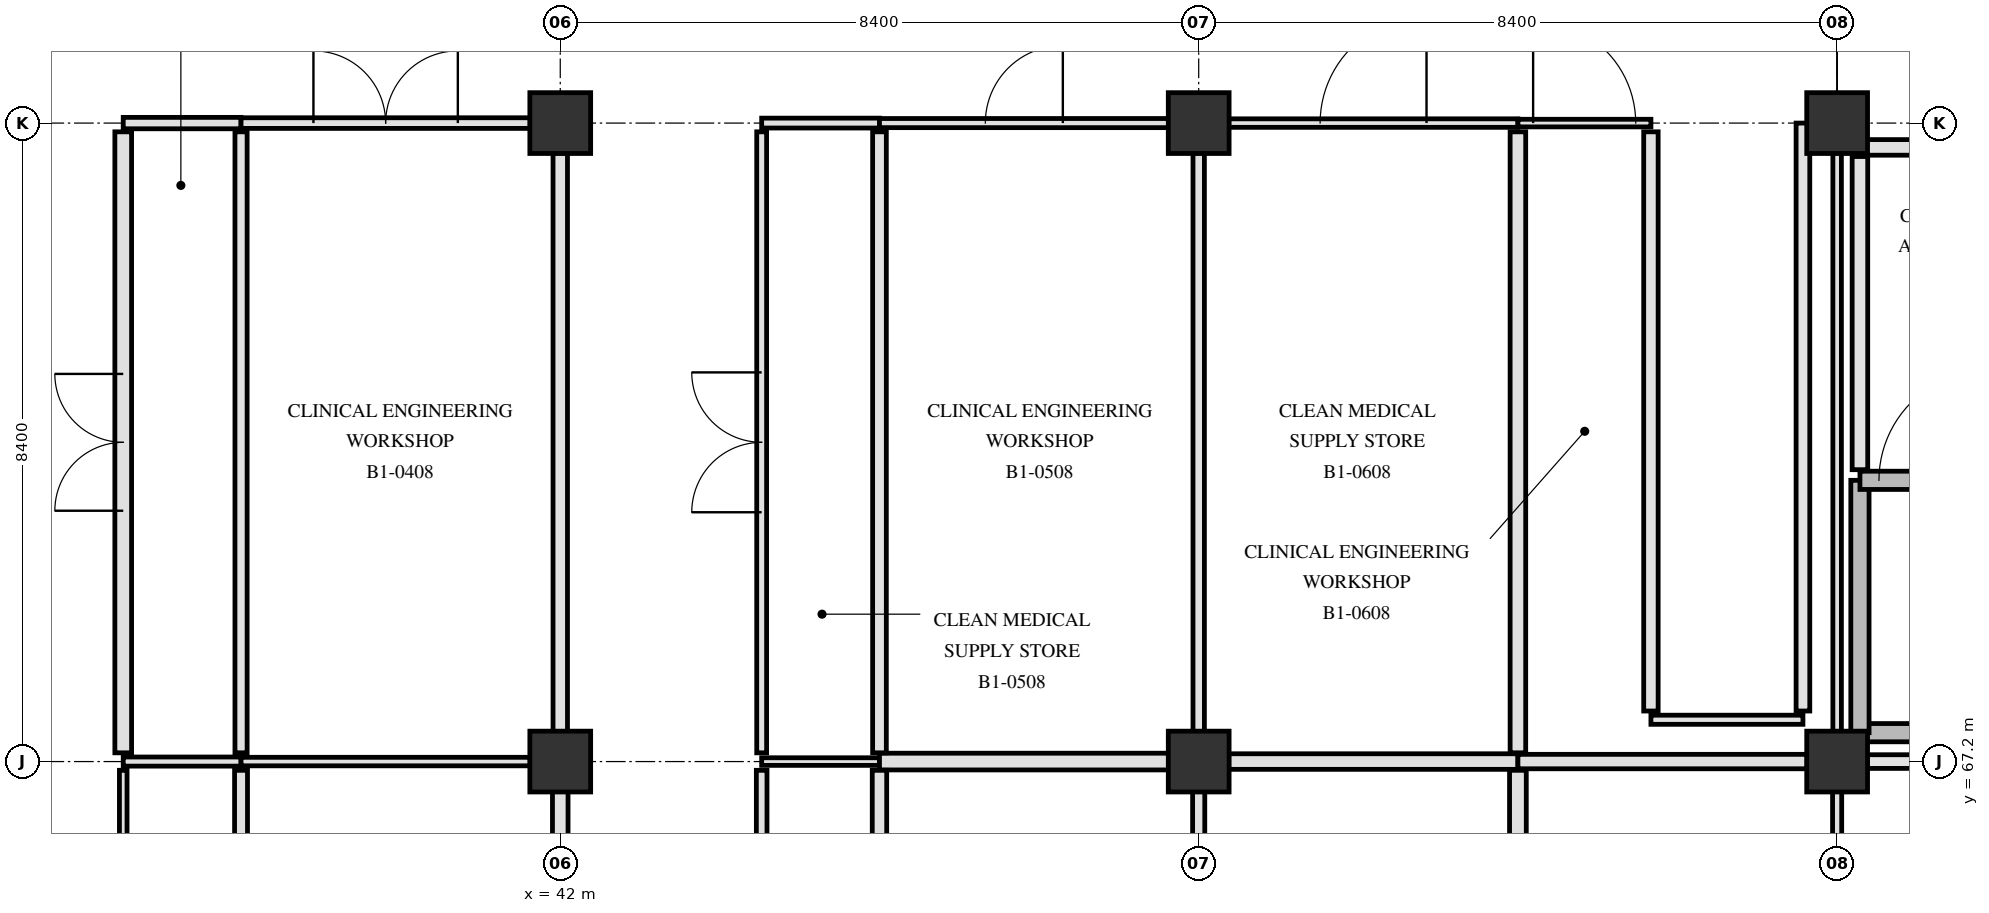
"""IFC4 building model, lengths in metres.
Left out: names, types, materials, properties, quantities, classifications, styles, units other than length and angle.
Written with IfcOpenShell. Run it as: python <this file> out.ifc"""

import sys

from ifc_helpers import new_model, si_unit, direction, frame, frame_2d, origin, origin_2d, place, context, subcontext, project, spatial, rectangle, extrude, element, fill, save


model = new_model("IFC4")
c1 = context("Model", 3, precision=1e-05, world=origin(), true_north=direction((0.0, 1.0)))
c2 = subcontext(c1, "Body", "Model", "MODEL_VIEW")
j1 = project(units=[si_unit("LENGTHUNIT", "METRE"), si_unit("PLANEANGLEUNIT", "RADIAN")], contexts=[c1])
p1 = place(None, origin())
s1 = spatial("IfcSite", under=j1, at=p1, CompositionType="ELEMENT")
p2 = place(p1, origin())
s2 = spatial("IfcBuilding", under=s1, at=p2, CompositionType="ELEMENT")
p3 = place(p2, frame((0.0, 0.0, -5.4)))
s3 = spatial("IfcBuildingStorey", under=s2, at=p3, CompositionType="ELEMENT", Elevation=-5.4)
for number, where, z_axis, x_axis in (
    (1, (42.0, 67.2, 0.0), (0.0, 0.0, 1.0), (1.0, 0.0, 0.0)),
    (2, (42.0, 75.6, 0.0), (0.0, 0.0, 1.0), (1.0, 0.0, 0.0)),
    (3, (50.4, 67.2, 0.0), (0.0, 0.0, 1.0), (1.0, 0.0, 0.0)),
    (4, (50.4, 75.6, 0.0), (0.0, 0.0, 1.0), (1.0, 0.0, 0.0)),
    (5, (58.8, 67.2, 0.0), (0.0, 0.0, 1.0), (1.0, 0.0, 0.0)),
    (6, (58.8, 75.6, 0.0), (0.0, 0.0, 1.0), (1.0, 0.0, 0.0)),
):
    element("IfcColumn", number, at=place(p3, frame(where, z_axis=z_axis, x_axis=x_axis)), inside=s3, PredefinedType="COLUMN", context=c2, shape_type="SweptSolid", body=[
        extrude(rectangle(XDim=0.8, YDim=0.8, at=origin_2d()), origin(), (0.0, 0.0, 1.0), 5.4),
    ])
p4 = place(p3, frame((59.1, 67.58, 0.0), z_axis=(0.0, 0.0, 1.0), x_axis=(1.0, 0.0, 0.0)))
e7 = element("IfcWall", 7, at=p4, inside=s3, PredefinedType="SHEAR", context=c2, shape_type="SweptSolid", body=[
    extrude(rectangle(XDim=7.82, YDim=0.24, at=frame_2d((3.91, 0.0))), origin(), (0.0, 0.0, 1.0), 5.08),
])
p5 = place(p3, frame((59.1, 67.58, 0.0), z_axis=(0.0, 0.0, 1.0), x_axis=(0.0, 1.0, 0.0)))
e8 = element("IfcWall", 8, at=p5, inside=s3, PredefinedType="SHEAR", context=c2, shape_type="SweptSolid", body=[
    extrude(rectangle(XDim=3.32, YDim=0.24, at=frame_2d((1.66, 0.0))), origin(), (0.0, 0.0, 1.0), 5.08),
])
p6 = place(p3, frame((59.1, 70.9, 0.0), z_axis=(0.0, 0.0, 1.0), x_axis=(1.0, 0.0, 0.0)))
e9 = element("IfcWall", 9, at=p6, inside=s3, PredefinedType="SHEAR", context=c2, shape_type="SweptSolid", body=[
    extrude(rectangle(XDim=7.82, YDim=0.24, at=frame_2d((3.91, 0.0))), origin(), (0.0, 0.0, 1.0), 5.08),
])
p7 = place(p6, frame((0.25, 0.0, 0.0)))
e10 = element("IfcOpeningElement", 10, at=p7, cuts=e9, PredefinedType="OPENING", context=c2, shape_type="SweptSolid", body=[
    extrude(rectangle(XDim=1.45, YDim=2.2, at=frame_2d((0.725, 1.1))), frame((0.0, 0.13, 0.0), z_axis=(0.0, -1.0, 0.0), x_axis=(1.0, 0.0, 0.0)), (0.0, 0.0, 1.0), 0.26),
])
p8 = place(p3, frame((59.1, 71.04, 0.0), z_axis=(0.0, 0.0, 1.0), x_axis=(0.0, 1.0, 0.0)))
e11 = element("IfcWall", 11, at=p8, inside=s3, PredefinedType="PARTITIONING", context=c2, shape_type="SweptSolid", body=[
    extrude(rectangle(XDim=4.12, YDim=0.205, at=frame_2d((2.06, 0.0))), origin(), (0.0, 0.0, 1.0), 4.47),
])
p9 = place(p3, frame((59.1, 75.28, 0.0), z_axis=(0.0, 0.0, 1.0), x_axis=(1.0, 0.0, 0.0)))
e12 = element("IfcWall", 12, at=p9, inside=s3, PredefinedType="PARTITIONING", context=c2, shape_type="SweptSolid", body=[
    extrude(rectangle(XDim=4.18, YDim=0.205, at=frame_2d((2.09, 0.0))), origin(), (0.0, 0.0, 1.0), 4.42),
])
p10 = place(p9, frame((1.29, 0.0, 0.0)))
e13 = element("IfcOpeningElement", 13, at=p10, cuts=e12, PredefinedType="OPENING", context=c2, shape_type="SweptSolid", body=[
    extrude(rectangle(XDim=1.6, YDim=2.25, at=frame_2d((0.8, 1.125))), frame((0.0, 0.113, 0.0), z_axis=(0.0, -1.0, 0.0), x_axis=(1.0, 0.0, 0.0)), (0.0, 0.0, 1.0), 0.225),
])
p11 = place(p3, frame((36.25, 67.2, 0.0), z_axis=(0.0, 0.0, 1.0), x_axis=(1.0, 0.0, 0.0)))
e14 = element("IfcWall", 14, at=p11, inside=s3, PredefinedType="PARTITIONING", context=c2, shape_type="SweptSolid", body=[
    extrude(rectangle(XDim=1.55, YDim=0.12, at=frame_2d((0.775, 0.0))), origin(), (0.0, 0.0, 1.0), 4.42),
])
p12 = place(p3, frame((37.8, 67.2, 0.0), z_axis=(0.0, 0.0, 1.0), x_axis=(1.0, 0.0, 0.0)))
e15 = element("IfcWall", 15, at=p12, inside=s3, PredefinedType="PARTITIONING", context=c2, shape_type="SweptSolid", body=[
    extrude(rectangle(XDim=3.805, YDim=0.112, at=frame_2d((1.902, 0.0))), origin(), (0.0, 0.0, 1.0), 4.42),
])
p13 = place(p3, frame((44.65, 67.2, 0.0), z_axis=(0.0, 0.0, 1.0), x_axis=(1.0, 0.0, 0.0)))
e16 = element("IfcWall", 16, at=p13, inside=s3, PredefinedType="PARTITIONING", context=c2, shape_type="SweptSolid", body=[
    extrude(rectangle(XDim=1.55, YDim=0.1, at=frame_2d((0.775, 0.0))), origin(), (0.0, 0.0, 1.0), 4.42),
])
p14 = place(p3, frame((46.2, 67.2, 0.0), z_axis=(0.0, 0.0, 1.0), x_axis=(1.0, 0.0, 0.0)))
e17 = element("IfcWall", 17, at=p14, inside=s3, PredefinedType="PARTITIONING", context=c2, shape_type="SweptSolid", body=[
    extrude(rectangle(XDim=3.805, YDim=0.22, at=frame_2d((1.902, 0.0))), origin(), (0.0, 0.0, 1.0), 4.42),
])
p15 = place(p3, frame((50.795, 67.2, 0.0), z_axis=(0.0, 0.0, 1.0), x_axis=(1.0, 0.0, 0.0)))
e18 = element("IfcWall", 18, at=p15, inside=s3, PredefinedType="PARTITIONING", context=c2, shape_type="SweptSolid", body=[
    extrude(rectangle(XDim=3.805, YDim=0.205, at=frame_2d((1.903, 0.0))), origin(), (0.0, 0.0, 1.0), 4.42),
])
p16 = place(p3, frame((54.6, 67.2, 0.0), z_axis=(0.0, 0.0, 1.0), x_axis=(1.0, 0.0, 0.0)))
e19 = element("IfcWall", 19, at=p16, inside=s3, PredefinedType="PARTITIONING", context=c2, shape_type="SweptSolid", body=[
    extrude(rectangle(XDim=3.805, YDim=0.19, at=frame_2d((1.902, 0.0))), origin(), (0.0, 0.0, 1.0), 4.42),
])
p17 = place(p3, frame((59.195, 67.2, 0.0), z_axis=(0.0, 0.0, 1.0), x_axis=(1.0, 0.0, 0.0)))
e20 = element("IfcWall", 20, at=p17, inside=s3, PredefinedType="PARTITIONING", context=c2, shape_type="SweptSolid", body=[
    extrude(rectangle(XDim=3.805, YDim=0.18, at=frame_2d((1.902, 0.0))), origin(), (0.0, 0.0, 1.0), 4.42),
])
p18 = place(p3, frame((56.35, 67.75, 0.0), z_axis=(0.0, 0.0, 1.0), x_axis=(1.0, 0.0, 0.0)))
e21 = element("IfcWall", 21, at=p18, inside=s3, PredefinedType="PARTITIONING", context=c2, shape_type="SweptSolid", body=[
    extrude(rectangle(XDim=2.0, YDim=0.12, at=frame_2d((1.0, 0.0))), origin(), (0.0, 0.0, 1.0), 5.07),
])
p19 = place(p3, frame((36.25, 75.6, 0.0), z_axis=(0.0, 0.0, 1.0), x_axis=(1.0, 0.0, 0.0)))
e22 = element("IfcWall", 22, at=p19, inside=s3, PredefinedType="PARTITIONING", context=c2, shape_type="SweptSolid", body=[
    extrude(rectangle(XDim=1.55, YDim=0.15, at=frame_2d((0.775, 0.0))), origin(), (0.0, 0.0, 1.0), 4.42),
])
p20 = place(p3, frame((37.8, 75.6, 0.0), z_axis=(0.0, 0.0, 1.0), x_axis=(1.0, 0.0, 0.0)))
e23 = element("IfcWall", 23, at=p20, inside=s3, PredefinedType="PARTITIONING", context=c2, shape_type="SweptSolid", body=[
    extrude(rectangle(XDim=3.805, YDim=0.14, at=frame_2d((1.902, 0.0))), origin(), (0.0, 0.0, 1.0), 4.42),
])
p21 = place(p20, frame((0.952, 0.0, 0.0)))
e24 = element("IfcOpeningElement", 24, at=p21, cuts=e23, PredefinedType="OPENING", context=c2, shape_type="SweptSolid", body=[
    extrude(rectangle(XDim=1.9, YDim=2.3, at=frame_2d((0.95, 1.15))), frame((0.0, 0.08, 0.0), z_axis=(0.0, -1.0, 0.0), x_axis=(1.0, 0.0, 0.0)), (0.0, 0.0, 1.0), 0.16),
])
p22 = place(p3, frame((44.65, 75.6, 0.0), z_axis=(0.0, 0.0, 1.0), x_axis=(1.0, 0.0, 0.0)))
e25 = element("IfcWall", 25, at=p22, inside=s3, PredefinedType="PARTITIONING", context=c2, shape_type="SweptSolid", body=[
    extrude(rectangle(XDim=1.55, YDim=0.13, at=frame_2d((0.775, 0.0))), origin(), (0.0, 0.0, 1.0), 4.42),
])
p23 = place(p3, frame((46.2, 75.6, 0.0), z_axis=(0.0, 0.0, 1.0), x_axis=(1.0, 0.0, 0.0)))
e26 = element("IfcWall", 26, at=p23, inside=s3, PredefinedType="PARTITIONING", context=c2, shape_type="SweptSolid", body=[
    extrude(rectangle(XDim=3.805, YDim=0.12, at=frame_2d((1.902, 0.0))), origin(), (0.0, 0.0, 1.0), 4.42),
])
p24 = place(p23, frame((1.393, 0.0, 0.0)))
e27 = element("IfcOpeningElement", 27, at=p24, cuts=e26, PredefinedType="OPENING", context=c2, shape_type="SweptSolid", body=[
    extrude(rectangle(XDim=1.02, YDim=2.12, at=frame_2d((0.51, 1.06))), frame((0.0, 0.07, 0.0), z_axis=(0.0, -1.0, 0.0), x_axis=(1.0, 0.0, 0.0)), (0.0, 0.0, 1.0), 0.14),
])
p25 = place(p3, frame((50.795, 75.6, 0.0), z_axis=(0.0, 0.0, 1.0), x_axis=(1.0, 0.0, 0.0)))
e28 = element("IfcWall", 28, at=p25, inside=s3, PredefinedType="PARTITIONING", context=c2, shape_type="SweptSolid", body=[
    extrude(rectangle(XDim=3.805, YDim=0.112, at=frame_2d((1.903, 0.0))), origin(), (0.0, 0.0, 1.0), 4.42),
])
p26 = place(p25, frame((1.202, 0.0, 0.0)))
e29 = element("IfcOpeningElement", 29, at=p26, cuts=e28, PredefinedType="OPENING", context=c2, shape_type="SweptSolid", body=[
    extrude(rectangle(XDim=1.4, YDim=2.2, at=frame_2d((0.7, 1.1))), frame((0.0, 0.066, 0.0), z_axis=(0.0, -1.0, 0.0), x_axis=(1.0, 0.0, 0.0)), (0.0, 0.0, 1.0), 0.132),
])
p27 = place(p3, frame((54.6, 75.6, 0.0), z_axis=(0.0, 0.0, 1.0), x_axis=(1.0, 0.0, 0.0)))
e30 = element("IfcWall", 30, at=p27, inside=s3, PredefinedType="PARTITIONING", context=c2, shape_type="SweptSolid", body=[
    extrude(rectangle(XDim=1.75, YDim=0.1, at=frame_2d((0.875, 0.0))), origin(), (0.0, 0.0, 1.0), 4.42),
])
p28 = place(p27, frame((0.2, 0.0, 0.0)))
e31 = element("IfcOpeningElement", 31, at=p28, cuts=e30, PredefinedType="OPENING", context=c2, shape_type="SweptSolid", body=[
    extrude(rectangle(XDim=1.35, YDim=2.2, at=frame_2d((0.675, 1.1))), frame((0.0, 0.06, 0.0), z_axis=(0.0, -1.0, 0.0), x_axis=(1.0, 0.0, 0.0)), (0.0, 0.0, 1.0), 0.12),
])
p29 = place(p3, frame((36.25, 61.515, 0.0), z_axis=(0.0, 0.0, 1.0), x_axis=(0.0, 1.0, 0.0)))
e32 = element("IfcWall", 32, at=p29, inside=s3, PredefinedType="PARTITIONING", context=c2, shape_type="SweptSolid", body=[
    extrude(rectangle(XDim=5.57, YDim=0.1, at=frame_2d((2.785, 0.0))), origin(), (0.0, 0.0, 1.0), 4.42),
])
p30 = place(p29, frame((2.06, 0.0, 0.0)))
e33 = element("IfcOpeningElement", 33, at=p30, cuts=e32, PredefinedType="OPENING", context=c2, shape_type="SweptSolid", body=[
    extrude(rectangle(XDim=1.45, YDim=2.2, at=frame_2d((0.725, 1.1))), frame((0.0, 0.06, 0.0), z_axis=(0.0, -1.0, 0.0), x_axis=(1.0, 0.0, 0.0)), (0.0, 0.0, 1.0), 0.12),
])
p31 = place(p3, frame((36.25, 67.315, 0.0), z_axis=(0.0, 0.0, 1.0), x_axis=(0.0, 1.0, 0.0)))
e34 = element("IfcWall", 34, at=p31, inside=s3, PredefinedType="PARTITIONING", context=c2, shape_type="SweptSolid", body=[
    extrude(rectangle(XDim=8.17, YDim=0.22, at=frame_2d((4.085, 0.0))), origin(), (0.0, 0.0, 1.0), 4.42),
])
p32 = place(p31, frame((3.185, 0.0, 0.0)))
e35 = element("IfcOpeningElement", 35, at=p32, cuts=e34, PredefinedType="OPENING", context=c2, shape_type="SweptSolid", body=[
    extrude(rectangle(XDim=1.8, YDim=2.25, at=frame_2d((0.9, 1.125))), frame((0.0, 0.12, 0.0), z_axis=(0.0, -1.0, 0.0), x_axis=(1.0, 0.0, 0.0)), (0.0, 0.0, 1.0), 0.24),
])
p33 = place(p3, frame((37.8, 61.515, 0.0), z_axis=(0.0, 0.0, 1.0), x_axis=(0.0, 1.0, 0.0)))
e36 = element("IfcWall", 36, at=p33, inside=s3, PredefinedType="PARTITIONING", context=c2, shape_type="SweptSolid", body=[
    extrude(rectangle(XDim=5.57, YDim=0.17, at=frame_2d((2.785, 0.0))), origin(), (0.0, 0.0, 1.0), 4.42),
])
p34 = place(p3, frame((37.8, 67.315, 0.0), z_axis=(0.0, 0.0, 1.0), x_axis=(0.0, 1.0, 0.0)))
e37 = element("IfcWall", 37, at=p34, inside=s3, PredefinedType="PARTITIONING", context=c2, shape_type="SweptSolid", body=[
    extrude(rectangle(XDim=8.17, YDim=0.16, at=frame_2d((4.085, 0.0))), origin(), (0.0, 0.0, 1.0), 4.42),
])
p35 = place(p3, frame((42.0, 61.515, 0.0), z_axis=(0.0, 0.0, 1.0), x_axis=(0.0, 1.0, 0.0)))
e38 = element("IfcWall", 38, at=p35, inside=s3, PredefinedType="PARTITIONING", context=c2, shape_type="SweptSolid", body=[
    extrude(rectangle(XDim=5.29, YDim=0.205, at=frame_2d((2.645, 0.0))), origin(), (0.0, 0.0, 1.0), 4.47),
])
p36 = place(p3, frame((42.0, 67.595, 0.0), z_axis=(0.0, 0.0, 1.0), x_axis=(0.0, 1.0, 0.0)))
e39 = element("IfcWall", 39, at=p36, inside=s3, PredefinedType="PARTITIONING", context=c2, shape_type="SweptSolid", body=[
    extrude(rectangle(XDim=7.61, YDim=0.19, at=frame_2d((3.805, 0.0))), origin(), (0.0, 0.0, 1.0), 4.47),
])
p37 = place(p3, frame((44.65, 61.515, 0.0), z_axis=(0.0, 0.0, 1.0), x_axis=(0.0, 1.0, 0.0)))
e40 = element("IfcWall", 40, at=p37, inside=s3, PredefinedType="PARTITIONING", context=c2, shape_type="SweptSolid", body=[
    extrude(rectangle(XDim=5.57, YDim=0.14, at=frame_2d((2.785, 0.0))), origin(), (0.0, 0.0, 1.0), 4.42),
])
p38 = place(p37, frame((1.965, 0.0, 0.0)))
e41 = element("IfcOpeningElement", 41, at=p38, cuts=e40, PredefinedType="OPENING", context=c2, shape_type="SweptSolid", body=[
    extrude(rectangle(XDim=1.64, YDim=2.28, at=frame_2d((0.82, 1.14))), frame((0.0, 0.08, 0.0), z_axis=(0.0, -1.0, 0.0), x_axis=(1.0, 0.0, 0.0)), (0.0, 0.0, 1.0), 0.16),
])
p39 = place(p3, frame((44.65, 67.315, 0.0), z_axis=(0.0, 0.0, 1.0), x_axis=(0.0, 1.0, 0.0)))
e42 = element("IfcWall", 42, at=p39, inside=s3, PredefinedType="PARTITIONING", context=c2, shape_type="SweptSolid", body=[
    extrude(rectangle(XDim=8.17, YDim=0.13, at=frame_2d((4.085, 0.0))), origin(), (0.0, 0.0, 1.0), 4.42),
])
p40 = place(p39, frame((3.165, 0.0, 0.0)))
e43 = element("IfcOpeningElement", 43, at=p40, cuts=e42, PredefinedType="OPENING", context=c2, shape_type="SweptSolid", body=[
    extrude(rectangle(XDim=1.84, YDim=2.28, at=frame_2d((0.92, 1.14))), frame((0.0, 0.075, 0.0), z_axis=(0.0, -1.0, 0.0), x_axis=(1.0, 0.0, 0.0)), (0.0, 0.0, 1.0), 0.15),
])
p41 = place(p3, frame((46.2, 61.515, 0.0), z_axis=(0.0, 0.0, 1.0), x_axis=(0.0, 1.0, 0.0)))
e44 = element("IfcWall", 44, at=p41, inside=s3, PredefinedType="PARTITIONING", context=c2, shape_type="SweptSolid", body=[
    extrude(rectangle(XDim=5.57, YDim=0.19, at=frame_2d((2.785, 0.0))), origin(), (0.0, 0.0, 1.0), 4.42),
])
p42 = place(p3, frame((46.2, 67.315, 0.0), z_axis=(0.0, 0.0, 1.0), x_axis=(0.0, 1.0, 0.0)))
e45 = element("IfcWall", 45, at=p42, inside=s3, PredefinedType="PARTITIONING", context=c2, shape_type="SweptSolid", body=[
    extrude(rectangle(XDim=8.17, YDim=0.18, at=frame_2d((4.085, 0.0))), origin(), (0.0, 0.0, 1.0), 4.42),
])
p43 = place(p3, frame((50.4, 61.515, 0.0), z_axis=(0.0, 0.0, 1.0), x_axis=(0.0, 1.0, 0.0)))
e46 = element("IfcWall", 46, at=p43, inside=s3, PredefinedType="PARTITIONING", context=c2, shape_type="SweptSolid", body=[
    extrude(rectangle(XDim=5.29, YDim=0.16, at=frame_2d((2.645, 0.0))), origin(), (0.0, 0.0, 1.0), 4.47),
])
p44 = place(p3, frame((50.4, 67.595, 0.0), z_axis=(0.0, 0.0, 1.0), x_axis=(0.0, 1.0, 0.0)))
e47 = element("IfcWall", 47, at=p44, inside=s3, PredefinedType="PARTITIONING", context=c2, shape_type="SweptSolid", body=[
    extrude(rectangle(XDim=7.61, YDim=0.15, at=frame_2d((3.805, 0.0))), origin(), (0.0, 0.0, 1.0), 4.47),
])
p45 = place(p3, frame((54.6, 61.515, 0.0), z_axis=(0.0, 0.0, 1.0), x_axis=(0.0, 1.0, 0.0)))
e48 = element("IfcWall", 48, at=p45, inside=s3, PredefinedType="PARTITIONING", context=c2, shape_type="SweptSolid", body=[
    extrude(rectangle(XDim=5.57, YDim=0.22, at=frame_2d((2.785, 0.0))), origin(), (0.0, 0.0, 1.0), 4.42),
])
p46 = place(p3, frame((54.6, 67.315, 0.0), z_axis=(0.0, 0.0, 1.0), x_axis=(0.0, 1.0, 0.0)))
e49 = element("IfcWall", 49, at=p46, inside=s3, PredefinedType="PARTITIONING", context=c2, shape_type="SweptSolid", body=[
    extrude(rectangle(XDim=8.17, YDim=0.205, at=frame_2d((4.085, 0.0))), origin(), (0.0, 0.0, 1.0), 4.42),
])
p47 = place(p3, frame((56.35, 67.865, 0.0), z_axis=(0.0, 0.0, 1.0), x_axis=(0.0, 1.0, 0.0)))
e50 = element("IfcWall", 50, at=p47, inside=s3, PredefinedType="PARTITIONING", context=c2, shape_type="SweptSolid", body=[
    extrude(rectangle(XDim=7.62, YDim=0.19, at=frame_2d((3.81, 0.0))), origin(), (0.0, 0.0, 1.0), 4.42),
])
p48 = place(p3, frame((58.35, 67.865, 0.0), z_axis=(0.0, 0.0, 1.0), x_axis=(0.0, 1.0, 0.0)))
e51 = element("IfcWall", 51, at=p48, inside=s3, PredefinedType="PARTITIONING", context=c2, shape_type="SweptSolid", body=[
    extrude(rectangle(XDim=7.735, YDim=0.18, at=frame_2d((3.868, 0.0))), origin(), (0.0, 0.0, 1.0), 4.42),
])
p49 = place(p3, frame((58.8, 61.515, 0.0), z_axis=(0.0, 0.0, 1.0), x_axis=(0.0, 1.0, 0.0)))
e52 = element("IfcWall", 52, at=p49, inside=s3, PredefinedType="PARTITIONING", context=c2, shape_type="SweptSolid", body=[
    extrude(rectangle(XDim=5.29, YDim=0.12, at=frame_2d((2.645, 0.0))), origin(), (0.0, 0.0, 1.0), 4.47),
])
p50 = place(p3, frame((58.8, 67.595, 0.0), z_axis=(0.0, 0.0, 1.0), x_axis=(0.0, 1.0, 0.0)))
e53 = element("IfcWall", 53, at=p50, inside=s3, PredefinedType="PARTITIONING", context=c2, shape_type="SweptSolid", body=[
    extrude(rectangle(XDim=7.61, YDim=0.112, at=frame_2d((3.805, 0.0))), origin(), (0.0, 0.0, 1.0), 4.47),
])
p51 = place(p7, origin())
e54 = element("IfcDoor", 54, at=p51, inside=s3, OperationType="SINGLE_SWING_RIGHT", PredefinedType="DOOR", context=c2, shape_type="SweptSolid", body=[
    extrude(rectangle(XDim=1.45, YDim=2.2, at=frame_2d((0.725, 1.1))), frame((0.0, 0.025, 0.0), z_axis=(0.0, -1.0, 0.0), x_axis=(1.0, 0.0, 0.0)), (0.0, 0.0, 1.0), 0.05),
])
fill(e10, e54)
p52 = place(p32, origin())
e55 = element("IfcDoor", 55, at=p52, inside=s3, OperationType="DOUBLE_SWING_RIGHT", PredefinedType="DOOR", context=c2, shape_type="SweptSolid", body=[
    extrude(rectangle(XDim=1.8, YDim=2.25, at=frame_2d((0.9, 1.125))), frame((0.0, 0.025, 0.0), z_axis=(0.0, -1.0, 0.0), x_axis=(1.0, 0.0, 0.0)), (0.0, 0.0, 1.0), 0.05),
])
fill(e35, e55)
p53 = place(p21, origin())
e56 = element("IfcDoor", 56, at=p53, inside=s3, OperationType="DOUBLE_SWING_LEFT", PredefinedType="DOOR", context=c2, shape_type="SweptSolid", body=[
    extrude(rectangle(XDim=1.9, YDim=2.3, at=frame_2d((0.95, 1.15))), frame((0.0, 0.025, 0.0), z_axis=(0.0, -1.0, 0.0), x_axis=(1.0, 0.0, 0.0)), (0.0, 0.0, 1.0), 0.05),
])
fill(e24, e56)
p54 = place(p40, origin())
e57 = element("IfcDoor", 57, at=p54, inside=s3, OperationType="DOUBLE_SWING_LEFT", PredefinedType="DOOR", context=c2, shape_type="SweptSolid", body=[
    extrude(rectangle(XDim=1.84, YDim=2.28, at=frame_2d((0.92, 1.14))), frame((0.0, 0.025, 0.0), z_axis=(0.0, -1.0, 0.0), x_axis=(1.0, 0.0, 0.0)), (0.0, 0.0, 1.0), 0.05),
])
fill(e43, e57)
p55 = place(p24, origin())
e58 = element("IfcDoor", 58, at=p55, inside=s3, OperationType="SINGLE_SWING_RIGHT", PredefinedType="DOOR", context=c2, shape_type="SweptSolid", body=[
    extrude(rectangle(XDim=1.02, YDim=2.12, at=frame_2d((0.51, 1.06))), frame((0.0, 0.025, 0.0), z_axis=(0.0, -1.0, 0.0), x_axis=(1.0, 0.0, 0.0)), (0.0, 0.0, 1.0), 0.05),
])
fill(e27, e58)
p56 = place(p26, origin())
e59 = element("IfcDoor", 59, at=p56, inside=s3, OperationType="SINGLE_SWING_RIGHT", PredefinedType="DOOR", context=c2, shape_type="SweptSolid", body=[
    extrude(rectangle(XDim=1.4, YDim=2.2, at=frame_2d((0.7, 1.1))), frame((0.0, 0.025, 0.0), z_axis=(0.0, -1.0, 0.0), x_axis=(1.0, 0.0, 0.0)), (0.0, 0.0, 1.0), 0.05),
])
fill(e29, e59)
p57 = place(p28, origin())
e60 = element("IfcDoor", 60, at=p57, inside=s3, OperationType="SINGLE_SWING_LEFT", PredefinedType="DOOR", context=c2, shape_type="SweptSolid", body=[
    extrude(rectangle(XDim=1.35, YDim=2.2, at=frame_2d((0.675, 1.1))), frame((0.0, 0.025, 0.0), z_axis=(0.0, -1.0, 0.0), x_axis=(1.0, 0.0, 0.0)), (0.0, 0.0, 1.0), 0.05),
])
fill(e31, e60)
save(model, sys.argv[1])
